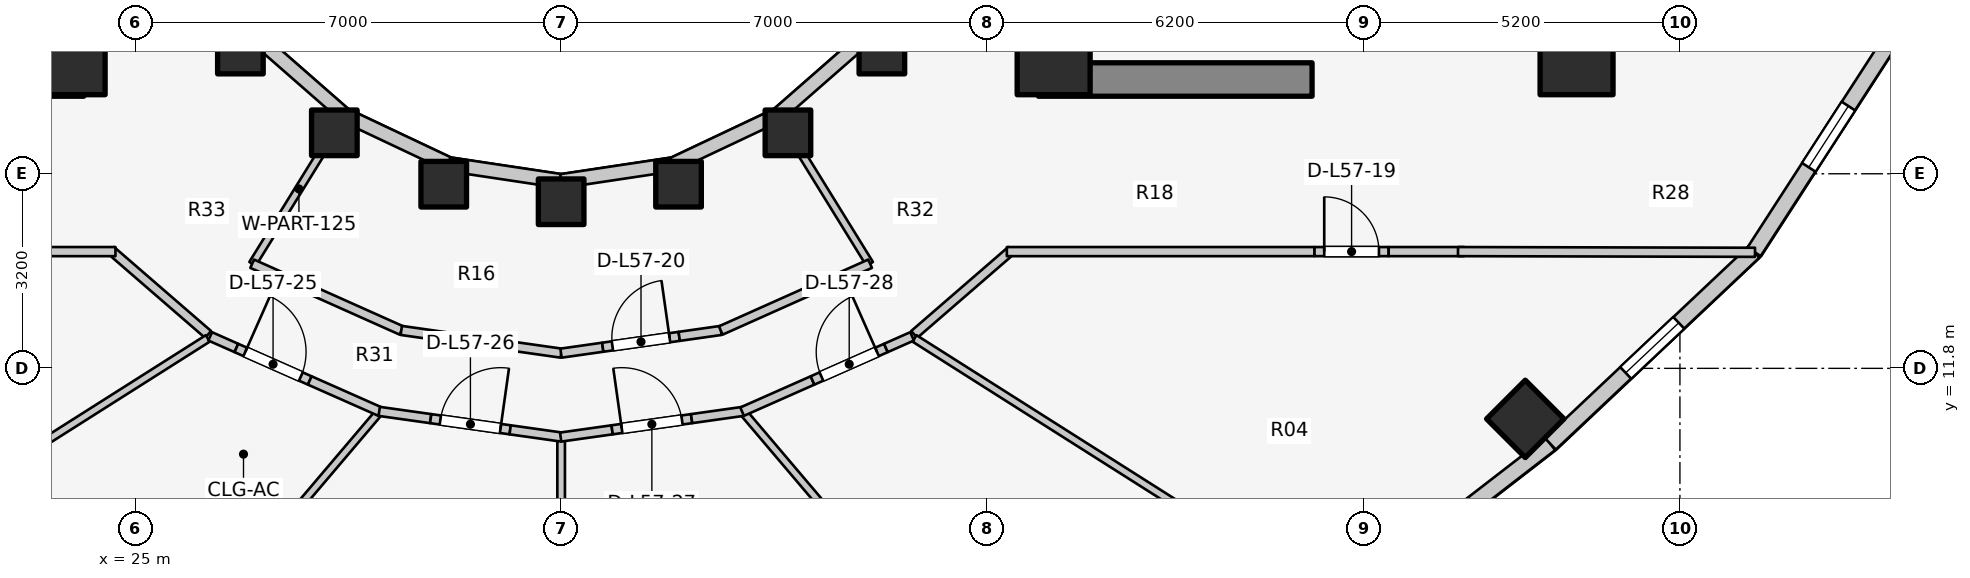
"""IFC4 building model, lengths in metres.
Left out: names, types, materials, properties, quantities, classifications, styles, units other than length and angle.
Written with IfcOpenShell. Run it as: python <this file> out.ifc"""

import sys

from ifc_helpers import new_model, si_unit, direction, frame, frame_2d, origin, origin_2d, place, context, subcontext, project, spatial, rectangle, extrude, element, fill, save


model = new_model("IFC4")
c1 = context("Model", 3, precision=1e-05, world=origin(), true_north=direction((0.0, 1.0)))
c2 = subcontext(c1, "Body", "Model", "MODEL_VIEW")
j1 = project(units=[si_unit("LENGTHUNIT", "METRE"), si_unit("PLANEANGLEUNIT", "RADIAN")], contexts=[c1])
p1 = place(None, origin())
s1 = spatial("IfcSite", under=j1, at=p1, CompositionType="ELEMENT")
p2 = place(p1, origin())
s2 = spatial("IfcBuilding", under=s1, at=p2, CompositionType="ELEMENT")
p3 = place(p2, frame((0.0, 0.0, 187.0)))
s3 = spatial("IfcBuildingStorey", under=s2, at=p3, CompositionType="ELEMENT", Elevation=187.0)
for number, where, z_axis, x_axis in (
    (1, (19.65, 16.55, 0.0), (0.0, 0.0, 1.0), (1.0, 0.0, 0.0)),
    (2, (39.85, 16.55, 0.0), (0.0, 0.0, 1.0), (1.0, 0.0, 0.0)),
):
    element("IfcWall", number, at=place(p3, frame(where, z_axis=z_axis, x_axis=x_axis)), inside=s3, PredefinedType="SHEAR", context=c2, shape_type="SweptSolid", body=[
        extrude(rectangle(XDim=4.5, YDim=0.55, at=frame_2d((2.25, 0.0))), origin(), (0.0, 0.0, 1.0), 3.1),
    ])
for number, where, z_axis, x_axis in (
    (3, (23.9, 16.9, 0.0), (0.0, 0.0, 1.0), (1.0, 0.0, 0.0)),
    (4, (40.1, 16.9, 0.0), (0.0, 0.0, 1.0), (1.0, 0.0, 0.0)),
    (5, (48.7, 16.9, 0.0), (0.0, 0.0, 1.0), (1.0, 0.0, 0.0)),
):
    element("IfcColumn", number, at=place(p3, frame(where, z_axis=z_axis, x_axis=x_axis)), inside=s3, PredefinedType="COLUMN", context=c2, shape_type="SweptSolid", body=[
        extrude(rectangle(XDim=1.2, YDim=1.2, at=origin_2d()), origin(), (0.0, 0.0, 1.0), 3.1),
    ])
for number, where, z_axis, x_axis in (
    (6, (26.725, 17.018, 0.0), (0.0, 0.0, 1.0), (1.0, 0.0, 0.0)),
    (7, (28.27, 15.673, 0.0), (0.0, 0.0, 1.0), (1.0, 0.0, 0.0)),
    (8, (30.069, 14.828, 0.0), (0.0, 0.0, 1.0), (1.0, 0.0, 0.0)),
    (9, (32.0, 14.54, 0.0), (0.0, 0.0, 1.0), (1.0, 0.0, 0.0)),
    (10, (33.931, 14.828, 0.0), (0.0, 0.0, 1.0), (1.0, 0.0, 0.0)),
    (11, (35.73, 15.673, 0.0), (0.0, 0.0, 1.0), (1.0, 0.0, 0.0)),
    (12, (37.275, 17.018, 0.0), (0.0, 0.0, 1.0), (1.0, 0.0, 0.0)),
):
    element("IfcColumn", number, at=place(p3, frame(where, z_axis=z_axis, x_axis=x_axis)), inside=s3, PredefinedType="COLUMN", context=c2, shape_type="SweptSolid", body=[
        extrude(rectangle(XDim=0.75, YDim=0.75, at=origin_2d()), origin(), (0.0, 0.0, 1.0), 3.1),
    ])
p4 = place(p3, frame((47.857, 10.969, 0.0), z_axis=(0.0, 0.0, 1.0), x_axis=(0.707106781187, -0.707106781187, 0.0)))
e13 = element("IfcColumn", 13, at=p4, inside=s3, PredefinedType="COLUMN", context=c2, shape_type="SweptSolid", body=[
    extrude(rectangle(XDim=0.9, YDim=0.9, at=origin_2d()), origin(), (0.0, 0.0, 1.0), 3.1),
])
p5 = place(p3, frame((26.965, 17.258, 0.0), z_axis=(0.0, 0.0, 1.0), x_axis=(0.752576694707, -0.658504607869, 0.0)))
e14 = element("IfcWall", 14, at=p5, inside=s3, PredefinedType="STANDARD", context=c2, shape_type="SweptSolid", body=[
    extrude(rectangle(XDim=1.959, YDim=0.23, at=frame_2d((0.98, 0.0))), origin(), (0.0, 0.0, 1.0), 1.22),
])
p6 = place(p3, frame((28.44, 15.968, 0.0), z_axis=(0.0, 0.0, 1.0), x_axis=(0.904179699603, -0.427152280606, 0.0)))
e15 = element("IfcWall", 15, at=p6, inside=s3, PredefinedType="STANDARD", context=c2, shape_type="SweptSolid", body=[
    extrude(rectangle(XDim=1.899, YDim=0.23, at=frame_2d((0.95, 0.0))), origin(), (0.0, 0.0, 1.0), 1.22),
])
for number, where, z_axis, x_axis in (
    (16, (30.157, 15.157, 0.0), (0.0, 0.0, 1.0), (0.989, -0.149, 0.0)),
    (17, (32.0, 14.88, 0.0), (0.0, 0.0, 1.0), (0.989, 0.149, 0.0)),
):
    element("IfcWall", number, at=place(p3, frame(where, z_axis=z_axis, x_axis=x_axis)), inside=s3, PredefinedType="STANDARD", context=c2, shape_type="SweptSolid", body=[
        extrude(rectangle(XDim=1.864, YDim=0.23, at=frame_2d((0.932, 0.0))), origin(), (0.0, 0.0, 1.0), 1.22),
    ])
p7 = place(p3, frame((33.843, 15.157, 0.0), z_axis=(0.0, 0.0, 1.0), x_axis=(0.904179699603, 0.427152280606, 0.0)))
e18 = element("IfcWall", 18, at=p7, inside=s3, PredefinedType="STANDARD", context=c2, shape_type="SweptSolid", body=[
    extrude(rectangle(XDim=1.899, YDim=0.23, at=frame_2d((0.95, 0.0))), origin(), (0.0, 0.0, 1.0), 1.22),
])
p8 = place(p3, frame((35.56, 15.968, 0.0), z_axis=(0.0, 0.0, 1.0), x_axis=(0.752576694707, 0.658504607869, 0.0)))
e19 = element("IfcWall", 19, at=p8, inside=s3, PredefinedType="STANDARD", context=c2, shape_type="SweptSolid", body=[
    extrude(rectangle(XDim=1.959, YDim=0.23, at=frame_2d((0.98, 0.0))), origin(), (0.0, 0.0, 1.0), 1.22),
])
p9 = place(p3, frame((44.413, 7.581, 0.0), z_axis=(0.0, 0.0, 1.0), x_axis=(0.791460185804, 0.611220724687, 0.0)))
e20 = element("IfcWall", 20, at=p9, inside=s3, PredefinedType="STANDARD", context=c2, shape_type="SweptSolid", body=[
    extrude(rectangle(XDim=4.872, YDim=0.26, at=frame_2d((2.436, 0.0))), origin(), (0.0, 0.0, 1.0), 1.22),
])
p10 = place(p3, frame((48.269, 10.559, 0.0), z_axis=(0.0, 0.0, 1.0), x_axis=(0.727667301037, 0.68593024354, 0.0)))
e21 = element("IfcWall", 21, at=p10, inside=s3, PredefinedType="STANDARD", context=c2, shape_type="SweptSolid", body=[
    extrude(rectangle(XDim=4.604, YDim=0.26, at=frame_2d((2.302, 0.0))), origin(), (0.0, 0.0, 1.0), 1.22),
])
p11 = place(p10, frame((1.702, 0.0, 0.15)))
e22 = element("IfcOpeningElement", 22, at=p11, cuts=e21, PredefinedType="OPENING", context=c2, shape_type="SweptSolid", body=[
    extrude(rectangle(XDim=1.2, YDim=0.9, at=frame_2d((0.6, 0.45))), frame((0.0, 0.14, 0.0), z_axis=(0.0, -1.0, 0.0), x_axis=(1.0, 0.0, 0.0)), (0.0, 0.0, 1.0), 0.28),
])
p12 = place(p3, frame((51.619, 13.716, 0.0), z_axis=(0.0, 0.0, 1.0), x_axis=(0.543358984534, 0.839500454989, 0.0)))
e23 = element("IfcWall", 23, at=p12, inside=s3, PredefinedType="STANDARD", context=c2, shape_type="SweptSolid", body=[
    extrude(rectangle(XDim=4.511, YDim=0.26, at=frame_2d((2.256, 0.0))), origin(), (0.0, 0.0, 1.0), 1.22),
])
p13 = place(p12, frame((1.656, 0.0, 0.15)))
e24 = element("IfcOpeningElement", 24, at=p13, cuts=e23, PredefinedType="OPENING", context=c2, shape_type="SweptSolid", body=[
    extrude(rectangle(XDim=1.2, YDim=0.9, at=frame_2d((0.6, 0.45))), frame((0.0, 0.14, 0.0), z_axis=(0.0, -1.0, 0.0), x_axis=(1.0, 0.0, 0.0)), (0.0, 0.0, 1.0), 0.28),
])
p14 = place(p3, frame((26.193, 12.358, 0.0), z_axis=(0.0, 0.0, 1.0), x_axis=(-0.756055312247, 0.654507727092, 0.0)))
e25 = element("IfcWall", 25, at=p14, inside=s3, PredefinedType="PARTITIONING", context=c2, shape_type="SweptSolid", body=[
    extrude(rectangle(XDim=2.111, YDim=0.15, at=frame_2d((1.055, 0.0))), origin(), (0.0, 0.0, 1.0), 1.22),
])
p15 = place(p3, frame((19.51, 13.72, 0.0), z_axis=(0.0, 0.0, 1.0), x_axis=(1.0, 0.0, 0.0)))
e26 = element("IfcWall", 26, at=p15, inside=s3, PredefinedType="PARTITIONING", context=c2, shape_type="SweptSolid", body=[
    extrude(rectangle(XDim=5.16, YDim=0.15, at=frame_2d((2.58, 0.0))), origin(), (0.0, 0.0, 1.0), 1.22),
])
p16 = place(p3, frame((37.807, 12.358, 0.0), z_axis=(0.0, 0.0, 1.0), x_axis=(0.756055312247, 0.654507727092, 0.0)))
e27 = element("IfcWall", 27, at=p16, inside=s3, PredefinedType="PARTITIONING", context=c2, shape_type="SweptSolid", body=[
    extrude(rectangle(XDim=2.111, YDim=0.15, at=frame_2d((1.055, 0.0))), origin(), (0.0, 0.0, 1.0), 1.22),
])
p17 = place(p3, frame((39.33, 13.72, 0.0), z_axis=(0.0, 0.0, 1.0), x_axis=(1.0, 0.0, 0.0)))
e28 = element("IfcWall", 28, at=p17, inside=s3, PredefinedType="PARTITIONING", context=c2, shape_type="SweptSolid", body=[
    extrude(rectangle(XDim=5.06, YDim=0.15, at=frame_2d((2.53, 0.0))), origin(), (0.0, 0.0, 1.0), 1.22),
])
p18 = place(p3, frame((44.39, 13.72, 0.0), z_axis=(0.0, 0.0, 1.0), x_axis=(1.0, 0.0, 0.0)))
e29 = element("IfcWall", 29, at=p18, inside=s3, PredefinedType="PARTITIONING", context=c2, shape_type="SweptSolid", body=[
    extrude(rectangle(XDim=1.22, YDim=0.15, at=frame_2d((0.61, 0.0))), origin(), (0.0, 0.0, 1.0), 2.575),
])
p19 = place(p18, frame((0.16, 0.0, 0.0)))
e30 = element("IfcOpeningElement", 30, at=p19, cuts=e29, PredefinedType="OPENING", context=c2, shape_type="SweptSolid", body=[
    extrude(rectangle(XDim=0.9, YDim=2.1, at=frame_2d((0.45, 1.05))), frame((0.0, 0.085, 0.0), z_axis=(0.0, -1.0, 0.0), x_axis=(1.0, 0.0, 0.0)), (0.0, 0.0, 1.0), 0.17),
])
p20 = place(p3, frame((45.61, 13.72, 0.0), z_axis=(0.0, 0.0, 1.0), x_axis=(1.0, 0.0, 0.0)))
e31 = element("IfcWall", 31, at=p20, inside=s3, PredefinedType="PARTITIONING", context=c2, shape_type="SweptSolid", body=[
    extrude(rectangle(XDim=1.24, YDim=0.15, at=frame_2d((0.62, 0.0))), origin(), (0.0, 0.0, 1.0), 2.575),
])
p21 = place(p3, frame((46.75, 13.72, 0.0), z_axis=(0.0, 0.0, 1.0), x_axis=(0.999997122315, -0.00239903348, 0.0)))
e32 = element("IfcWall", 32, at=p21, inside=s3, PredefinedType="PARTITIONING", context=c2, shape_type="SweptSolid", body=[
    extrude(rectangle(XDim=4.885, YDim=0.15, at=frame_2d((2.442, 0.0))), origin(), (0.0, 0.0, 1.0), 1.22),
])
for number, where, z_axis, x_axis in (
    (33, (28.45, 15.985, 0.0), (0.0, 0.0, 1.0), (-0.526, -0.851, 0.0)),
    (34, (35.55, 15.985, 0.0), (0.0, 0.0, 1.0), (0.526, -0.851, 0.0)),
):
    element("IfcWall", number, at=place(p3, frame(where, z_axis=z_axis, x_axis=x_axis)), inside=s3, PredefinedType="PARTITIONING", context=c2, shape_type="SweptSolid", body=[
        extrude(rectangle(XDim=2.901, YDim=0.125, at=frame_2d((1.451, 0.0))), origin(), (0.0, 0.0, 1.0), 1.22),
    ])
p22 = place(p3, frame((26.919, 13.521, 0.0), z_axis=(0.0, 0.0, 1.0), x_axis=(0.912888568324, -0.408208845842, 0.0)))
e35 = element("IfcWall", 35, at=p22, inside=s3, PredefinedType="PARTITIONING", context=c2, shape_type="SweptSolid", body=[
    extrude(rectangle(XDim=2.69, YDim=0.15, at=frame_2d((1.345, 0.0))), origin(), (0.0, 0.0, 1.0), 1.22),
])
p23 = place(p3, frame((29.371, 12.424, 0.0), z_axis=(0.0, 0.0, 1.0), x_axis=(0.990066775667, -0.1405979364, 0.0)))
e36 = element("IfcWall", 36, at=p23, inside=s3, PredefinedType="PARTITIONING", context=c2, shape_type="SweptSolid", body=[
    extrude(rectangle(XDim=2.657, YDim=0.15, at=frame_2d((1.328, 0.0))), origin(), (0.0, 0.0, 1.0), 1.22),
])
p24 = place(p3, frame((31.998, 12.05, 0.0), z_axis=(0.0, 0.0, 1.0), x_axis=(0.990082845611, 0.140484728093, 0.0)))
e37 = element("IfcWall", 37, at=p24, inside=s3, PredefinedType="PARTITIONING", context=c2, shape_type="SweptSolid", body=[
    extrude(rectangle(XDim=0.693, YDim=0.15, at=frame_2d((0.347, 0.0))), origin(), (0.0, 0.0, 1.0), 1.22),
])
p25 = place(p3, frame((32.685, 12.147, 0.0), z_axis=(0.0, 0.0, 1.0), x_axis=(0.990049212475, 0.140721557967, 0.0)))
e38 = element("IfcWall", 38, at=p25, inside=s3, PredefinedType="PARTITIONING", context=c2, shape_type="SweptSolid", body=[
    extrude(rectangle(XDim=1.27, YDim=0.15, at=frame_2d((0.635, 0.0))), origin(), (0.0, 0.0, 1.0), 2.575),
])
p26 = place(p25, frame((0.16, 0.0, 0.0)))
e39 = element("IfcOpeningElement", 39, at=p26, cuts=e38, PredefinedType="OPENING", context=c2, shape_type="SweptSolid", body=[
    extrude(rectangle(XDim=0.95, YDim=2.1, at=frame_2d((0.475, 1.05))), frame((0.0, 0.085, 0.0), z_axis=(0.0, -1.0, 0.0), x_axis=(1.0, 0.0, 0.0)), (0.0, 0.0, 1.0), 0.17),
])
p27 = place(p3, frame((33.942, 12.326, 0.0), z_axis=(0.0, 0.0, 1.0), x_axis=(0.990082845611, 0.140484728093, 0.0)))
e40 = element("IfcWall", 40, at=p27, inside=s3, PredefinedType="PARTITIONING", context=c2, shape_type="SweptSolid", body=[
    extrude(rectangle(XDim=0.693, YDim=0.15, at=frame_2d((0.347, 0.0))), origin(), (0.0, 0.0, 1.0), 2.575),
])
p28 = place(p3, frame((34.625, 12.423, 0.0), z_axis=(0.0, 0.0, 1.0), x_axis=(0.912888568324, 0.408208845842, 0.0)))
e41 = element("IfcWall", 41, at=p28, inside=s3, PredefinedType="PARTITIONING", context=c2, shape_type="SweptSolid", body=[
    extrude(rectangle(XDim=2.69, YDim=0.15, at=frame_2d((1.345, 0.0))), origin(), (0.0, 0.0, 1.0), 1.22),
])
p29 = place(p3, frame((26.188, 12.292, 0.0), z_axis=(0.0, 0.0, 1.0), x_axis=(-0.844640430122, -0.535334048799, 0.0)))
e42 = element("IfcWall", 42, at=p29, inside=s3, PredefinedType="PARTITIONING", context=c2, shape_type="SweptSolid", body=[
    extrude(rectangle(XDim=7.188, YDim=0.125, at=frame_2d((3.594, 0.0))), origin(), (0.0, 0.0, 1.0), 1.22),
])
p30 = place(p3, frame((28.98, 11.048, 0.0), z_axis=(0.0, 0.0, 1.0), x_axis=(-0.647173462792, -0.762342776615, 0.0)))
e43 = element("IfcWall", 43, at=p30, inside=s3, PredefinedType="PARTITIONING", context=c2, shape_type="SweptSolid", body=[
    extrude(rectangle(XDim=6.253, YDim=0.125, at=frame_2d((3.127, 0.0))), origin(), (0.0, 0.0, 1.0), 1.22),
])
p31 = place(p3, frame((32.0, 10.615, 0.0), z_axis=(0.0, 0.0, 1.0), x_axis=(0.0, -1.0, 0.0)))
e44 = element("IfcWall", 44, at=p31, inside=s3, PredefinedType="PARTITIONING", context=c2, shape_type="SweptSolid", body=[
    extrude(rectangle(XDim=5.065, YDim=0.125, at=frame_2d((2.532, 0.0))), origin(), (0.0, 0.0, 1.0), 1.22),
])
p32 = place(p3, frame((35.02, 11.048, 0.0), z_axis=(0.0, 0.0, 1.0), x_axis=(0.647173462792, -0.762342776615, 0.0)))
e45 = element("IfcWall", 45, at=p32, inside=s3, PredefinedType="PARTITIONING", context=c2, shape_type="SweptSolid", body=[
    extrude(rectangle(XDim=6.253, YDim=0.125, at=frame_2d((3.127, 0.0))), origin(), (0.0, 0.0, 1.0), 1.22),
])
p33 = place(p3, frame((37.812, 12.292, 0.0), z_axis=(0.0, 0.0, 1.0), x_axis=(0.844640430122, -0.535334048799, 0.0)))
e46 = element("IfcWall", 46, at=p33, inside=s3, PredefinedType="PARTITIONING", context=c2, shape_type="SweptSolid", body=[
    extrude(rectangle(XDim=7.188, YDim=0.125, at=frame_2d((3.594, 0.0))), origin(), (0.0, 0.0, 1.0), 1.22),
])
p34 = place(p3, frame((26.228, 12.326, 0.0), z_axis=(0.0, 0.0, 1.0), x_axis=(0.914387769504, -0.404839482983, 0.0)))
e47 = element("IfcWall", 47, at=p34, inside=s3, PredefinedType="PARTITIONING", context=c2, shape_type="SweptSolid", body=[
    extrude(rectangle(XDim=0.471, YDim=0.15, at=frame_2d((0.235, 0.0))), origin(), (0.0, 0.0, 1.0), 2.575),
])
p35 = place(p3, frame((26.659, 12.135, 0.0), z_axis=(0.0, 0.0, 1.0), x_axis=(0.914314172667, -0.405005671145, 0.0)))
e48 = element("IfcWall", 48, at=p35, inside=s3, PredefinedType="PARTITIONING", context=c2, shape_type="SweptSolid", body=[
    extrude(rectangle(XDim=1.32, YDim=0.15, at=frame_2d((0.66, 0.0))), origin(), (0.0, 0.0, 1.0), 2.16),
])
p36 = place(p35, frame((0.16, 0.0, 0.0)))
e49 = element("IfcOpeningElement", 49, at=p36, cuts=e48, PredefinedType="OPENING", context=c2, shape_type="SweptSolid", body=[
    extrude(rectangle(XDim=1.0, YDim=2.1, at=frame_2d((0.5, 1.05))), frame((0.0, 0.085, 0.0), z_axis=(0.0, -1.0, 0.0), x_axis=(1.0, 0.0, 0.0)), (0.0, 0.0, 1.0), 0.17),
])
p37 = place(p3, frame((27.866, 11.601, 0.0), z_axis=(0.0, 0.0, 1.0), x_axis=(0.914311660367, -0.405011342701, 0.0)))
e50 = element("IfcWall", 50, at=p37, inside=s3, PredefinedType="PARTITIONING", context=c2, shape_type="SweptSolid", body=[
    extrude(rectangle(XDim=1.267, YDim=0.15, at=frame_2d((0.633, 0.0))), origin(), (0.0, 0.0, 1.0), 1.22),
])
p38 = place(p3, frame((29.008, 11.092, 0.0), z_axis=(0.0, 0.0, 1.0), x_axis=(0.990238723834, -0.139381741342, 0.0)))
e51 = element("IfcWall", 51, at=p38, inside=s3, PredefinedType="PARTITIONING", context=c2, shape_type="SweptSolid", body=[
    extrude(rectangle(XDim=0.855, YDim=0.15, at=frame_2d((0.427, 0.0))), origin(), (0.0, 0.0, 1.0), 2.575),
])
p39 = place(p3, frame((29.854, 10.973, 0.0), z_axis=(0.0, 0.0, 1.0), x_axis=(0.990254187593, -0.139271834751, 0.0)))
e52 = element("IfcWall", 52, at=p39, inside=s3, PredefinedType="PARTITIONING", context=c2, shape_type="SweptSolid", body=[
    extrude(rectangle(XDim=1.32, YDim=0.15, at=frame_2d((0.66, 0.0))), origin(), (0.0, 0.0, 1.0), 2.575),
])
p40 = place(p39, frame((0.16, 0.0, 0.0)))
e53 = element("IfcOpeningElement", 53, at=p40, cuts=e52, PredefinedType="OPENING", context=c2, shape_type="SweptSolid", body=[
    extrude(rectangle(XDim=1.0, YDim=2.1, at=frame_2d((0.5, 1.05))), frame((0.0, 0.085, 0.0), z_axis=(0.0, -1.0, 0.0), x_axis=(1.0, 0.0, 0.0)), (0.0, 0.0, 1.0), 0.17),
])
for number, where, z_axis, x_axis in (
    (54, (31.162, 10.789, 0.0), (0.0, 0.0, 1.0), (0.99, -0.14, 0.0)),
    (55, (31.992, 10.67, 0.0), (0.0, 0.0, 1.0), (0.99, 0.14, 0.0)),
):
    element("IfcWall", number, at=place(p3, frame(where, z_axis=z_axis, x_axis=x_axis)), inside=s3, PredefinedType="PARTITIONING", context=c2, shape_type="SweptSolid", body=[
        extrude(rectangle(XDim=0.855, YDim=0.15, at=frame_2d((0.427, 0.0))), origin(), (0.0, 0.0, 1.0), 1.22),
    ])
p41 = place(p3, frame((32.838, 10.789, 0.0), z_axis=(0.0, 0.0, 1.0), x_axis=(0.990254187593, 0.139271834751, 0.0)))
e56 = element("IfcWall", 56, at=p41, inside=s3, PredefinedType="PARTITIONING", context=c2, shape_type="SweptSolid", body=[
    extrude(rectangle(XDim=1.32, YDim=0.15, at=frame_2d((0.66, 0.0))), origin(), (0.0, 0.0, 1.0), 2.575),
])
p42 = place(p41, frame((0.16, 0.0, 0.0)))
e57 = element("IfcOpeningElement", 57, at=p42, cuts=e56, PredefinedType="OPENING", context=c2, shape_type="SweptSolid", body=[
    extrude(rectangle(XDim=1.0, YDim=2.1, at=frame_2d((0.5, 1.05))), frame((0.0, 0.085, 0.0), z_axis=(0.0, -1.0, 0.0), x_axis=(1.0, 0.0, 0.0)), (0.0, 0.0, 1.0), 0.17),
])
p43 = place(p3, frame((34.146, 10.973, 0.0), z_axis=(0.0, 0.0, 1.0), x_axis=(0.990238723834, 0.139381741342, 0.0)))
e58 = element("IfcWall", 58, at=p43, inside=s3, PredefinedType="PARTITIONING", context=c2, shape_type="SweptSolid", body=[
    extrude(rectangle(XDim=0.855, YDim=0.15, at=frame_2d((0.427, 0.0))), origin(), (0.0, 0.0, 1.0), 2.575),
])
p44 = place(p3, frame((34.976, 11.088, 0.0), z_axis=(0.0, 0.0, 1.0), x_axis=(0.914311660367, 0.405011342701, 0.0)))
e59 = element("IfcWall", 59, at=p44, inside=s3, PredefinedType="PARTITIONING", context=c2, shape_type="SweptSolid", body=[
    extrude(rectangle(XDim=1.267, YDim=0.15, at=frame_2d((0.633, 0.0))), origin(), (0.0, 0.0, 1.0), 1.22),
])
p45 = place(p3, frame((36.134, 11.601, 0.0), z_axis=(0.0, 0.0, 1.0), x_axis=(0.914314172667, 0.405005671145, 0.0)))
e60 = element("IfcWall", 60, at=p45, inside=s3, PredefinedType="PARTITIONING", context=c2, shape_type="SweptSolid", body=[
    extrude(rectangle(XDim=1.32, YDim=0.15, at=frame_2d((0.66, 0.0))), origin(), (0.0, 0.0, 1.0), 2.16),
])
p46 = place(p45, frame((0.16, 0.0, 0.0)))
e61 = element("IfcOpeningElement", 61, at=p46, cuts=e60, PredefinedType="OPENING", context=c2, shape_type="SweptSolid", body=[
    extrude(rectangle(XDim=1.0, YDim=2.1, at=frame_2d((0.5, 1.05))), frame((0.0, 0.085, 0.0), z_axis=(0.0, -1.0, 0.0), x_axis=(1.0, 0.0, 0.0)), (0.0, 0.0, 1.0), 0.17),
])
p47 = place(p3, frame((37.341, 12.135, 0.0), z_axis=(0.0, 0.0, 1.0), x_axis=(0.914387769504, 0.404839482983, 0.0)))
e62 = element("IfcWall", 62, at=p47, inside=s3, PredefinedType="PARTITIONING", context=c2, shape_type="SweptSolid", body=[
    extrude(rectangle(XDim=0.471, YDim=0.15, at=frame_2d((0.235, 0.0))), origin(), (0.0, 0.0, 1.0), 2.575),
])
p48 = place(p11, origin())
e63 = element("IfcWindow", 63, at=p48, inside=s3, PartitioningType="SINGLE_PANEL", PredefinedType="WINDOW", context=c2, shape_type="SweptSolid", body=[
    extrude(rectangle(XDim=1.2, YDim=0.9, at=frame_2d((0.6, 0.45))), frame((0.0, 0.03, 0.0), z_axis=(0.0, -1.0, 0.0), x_axis=(1.0, 0.0, 0.0)), (0.0, 0.0, 1.0), 0.06),
])
fill(e22, e63)
p49 = place(p13, origin())
e64 = element("IfcWindow", 64, at=p49, inside=s3, PartitioningType="SINGLE_PANEL", PredefinedType="WINDOW", context=c2, shape_type="SweptSolid", body=[
    extrude(rectangle(XDim=1.2, YDim=0.9, at=frame_2d((0.6, 0.45))), frame((0.0, 0.03, 0.0), z_axis=(0.0, -1.0, 0.0), x_axis=(1.0, 0.0, 0.0)), (0.0, 0.0, 1.0), 0.06),
])
fill(e24, e64)
p50 = place(p19, origin())
e65 = element("IfcDoor", 65, at=p50, inside=s3, OperationType="SINGLE_SWING_LEFT", PredefinedType="DOOR", context=c2, shape_type="SweptSolid", body=[
    extrude(rectangle(XDim=0.9, YDim=2.1, at=frame_2d((0.45, 1.05))), frame((0.0, 0.025, 0.0), z_axis=(0.0, -1.0, 0.0), x_axis=(1.0, 0.0, 0.0)), (0.0, 0.0, 1.0), 0.05),
])
fill(e30, e65)
p51 = place(p26, origin())
e66 = element("IfcDoor", 66, at=p51, inside=s3, OperationType="SINGLE_SWING_RIGHT", PredefinedType="DOOR", context=c2, shape_type="SweptSolid", body=[
    extrude(rectangle(XDim=0.95, YDim=2.1, at=frame_2d((0.475, 1.05))), frame((0.0, 0.025, 0.0), z_axis=(0.0, -1.0, 0.0), x_axis=(1.0, 0.0, 0.0)), (0.0, 0.0, 1.0), 0.05),
])
fill(e39, e66)
p52 = place(p36, origin())
e67 = element("IfcDoor", 67, at=p52, inside=s3, OperationType="SINGLE_SWING_LEFT", PredefinedType="DOOR", context=c2, shape_type="SweptSolid", body=[
    extrude(rectangle(XDim=1.0, YDim=2.1, at=frame_2d((0.5, 1.05))), frame((0.0, 0.025, 0.0), z_axis=(0.0, -1.0, 0.0), x_axis=(1.0, 0.0, 0.0)), (0.0, 0.0, 1.0), 0.05),
])
fill(e49, e67)
p53 = place(p40, origin())
e68 = element("IfcDoor", 68, at=p53, inside=s3, OperationType="SINGLE_SWING_RIGHT", PredefinedType="DOOR", context=c2, shape_type="SweptSolid", body=[
    extrude(rectangle(XDim=1.0, YDim=2.1, at=frame_2d((0.5, 1.05))), frame((0.0, 0.025, 0.0), z_axis=(0.0, -1.0, 0.0), x_axis=(1.0, 0.0, 0.0)), (0.0, 0.0, 1.0), 0.05),
])
fill(e53, e68)
p54 = place(p42, origin())
e69 = element("IfcDoor", 69, at=p54, inside=s3, OperationType="SINGLE_SWING_LEFT", PredefinedType="DOOR", context=c2, shape_type="SweptSolid", body=[
    extrude(rectangle(XDim=1.0, YDim=2.1, at=frame_2d((0.5, 1.05))), frame((0.0, 0.025, 0.0), z_axis=(0.0, -1.0, 0.0), x_axis=(1.0, 0.0, 0.0)), (0.0, 0.0, 1.0), 0.05),
])
fill(e57, e69)
p55 = place(p46, origin())
e70 = element("IfcDoor", 70, at=p55, inside=s3, OperationType="SINGLE_SWING_RIGHT", PredefinedType="DOOR", context=c2, shape_type="SweptSolid", body=[
    extrude(rectangle(XDim=1.0, YDim=2.1, at=frame_2d((0.5, 1.05))), frame((0.0, 0.025, 0.0), z_axis=(0.0, -1.0, 0.0), x_axis=(1.0, 0.0, 0.0)), (0.0, 0.0, 1.0), 0.05),
])
fill(e61, e70)
save(model, sys.argv[1])
